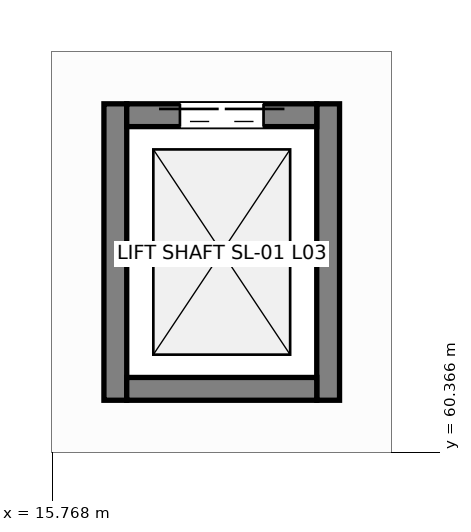
"""IFC4 building model, lengths in metres.
Left out: names, types, materials, properties, quantities, classifications, styles, units other than length and angle.
Written with IfcOpenShell. Run it as: python <this file> out.ifc"""

import sys

from ifc_helpers import new_model, si_unit, direction, frame, frame_2d, origin, place, context, subcontext, project, spatial, rectangle, extrude, element, fill, save


model = new_model("IFC4")
c1 = context("Model", 3, precision=1e-05, world=origin(), true_north=direction((0.0, 1.0)))
c2 = subcontext(c1, "Body", "Model", "MODEL_VIEW")
j1 = project(units=[si_unit("LENGTHUNIT", "METRE"), si_unit("PLANEANGLEUNIT", "RADIAN")], contexts=[c1])
p1 = place(None, origin())
s1 = spatial("IfcSite", under=j1, at=p1, CompositionType="ELEMENT")
p2 = place(p1, origin())
s2 = spatial("IfcBuilding", under=s1, at=p2, CompositionType="ELEMENT")
p3 = place(p2, frame((0.0, 0.0, 13.2)))
s3 = spatial("IfcBuildingStorey", under=s2, at=p3, CompositionType="ELEMENT", Elevation=13.2)
for number, where, z_axis, x_axis in (
    (1, (16.6, 61.05, 0.0), (0.0, 0.0, 1.0), (0.0, 1.0, 0.0)),
    (2, (19.4, 61.05, 0.0), (0.0, 0.0, 1.0), (0.0, 1.0, 0.0)),
):
    element("IfcWall", number, at=place(p3, frame(where, z_axis=z_axis, x_axis=x_axis)), inside=s3, PredefinedType="SHEAR", context=c2, shape_type="SweptSolid", body=[
        extrude(rectangle(XDim=3.9, YDim=0.3, at=frame_2d((1.95, 0.0))), origin(), (0.0, 0.0, 1.0), 3.99),
    ])
p4 = place(p3, frame((16.75, 64.8, 0.0), z_axis=(0.0, 0.0, 1.0), x_axis=(1.0, 0.0, 0.0)))
e3 = element("IfcWall", 3, at=p4, inside=s3, PredefinedType="SHEAR", context=c2, shape_type="SweptSolid", body=[
    extrude(rectangle(XDim=2.5, YDim=0.3, at=frame_2d((1.25, 0.0))), origin(), (0.0, 0.0, 1.0), 3.99),
])
p5 = place(p4, frame((0.7, 0.0, 0.0)))
e4 = element("IfcOpeningElement", 4, at=p5, cuts=e3, PredefinedType="OPENING", context=c2, shape_type="SweptSolid", body=[
    extrude(rectangle(XDim=1.1, YDim=2.15, at=frame_2d((0.55, 1.075))), frame((0.0, 0.16, 0.0), z_axis=(0.0, -1.0, 0.0), x_axis=(1.0, 0.0, 0.0)), (0.0, 0.0, 1.0), 0.32),
])
p6 = place(p3, frame((16.75, 61.2, 0.0), z_axis=(0.0, 0.0, 1.0), x_axis=(1.0, 0.0, 0.0)))
e5 = element("IfcWall", 5, at=p6, inside=s3, PredefinedType="SHEAR", context=c2, shape_type="SweptSolid", body=[
    extrude(rectangle(XDim=2.5, YDim=0.3, at=frame_2d((1.25, 0.0))), origin(), (0.0, 0.0, 1.0), 3.99),
])
p7 = place(p5, origin())
e6 = element("IfcDoor", 6, at=p7, inside=s3, OperationType="DOUBLE_DOOR_SLIDING", PredefinedType="DOOR", context=c2, shape_type="SweptSolid", body=[
    extrude(rectangle(XDim=1.1, YDim=2.15, at=frame_2d((0.55, 1.075))), frame((0.0, 0.025, 0.0), z_axis=(0.0, -1.0, 0.0), x_axis=(1.0, 0.0, 0.0)), (0.0, 0.0, 1.0), 0.05),
])
fill(e4, e6)
save(model, sys.argv[1])
